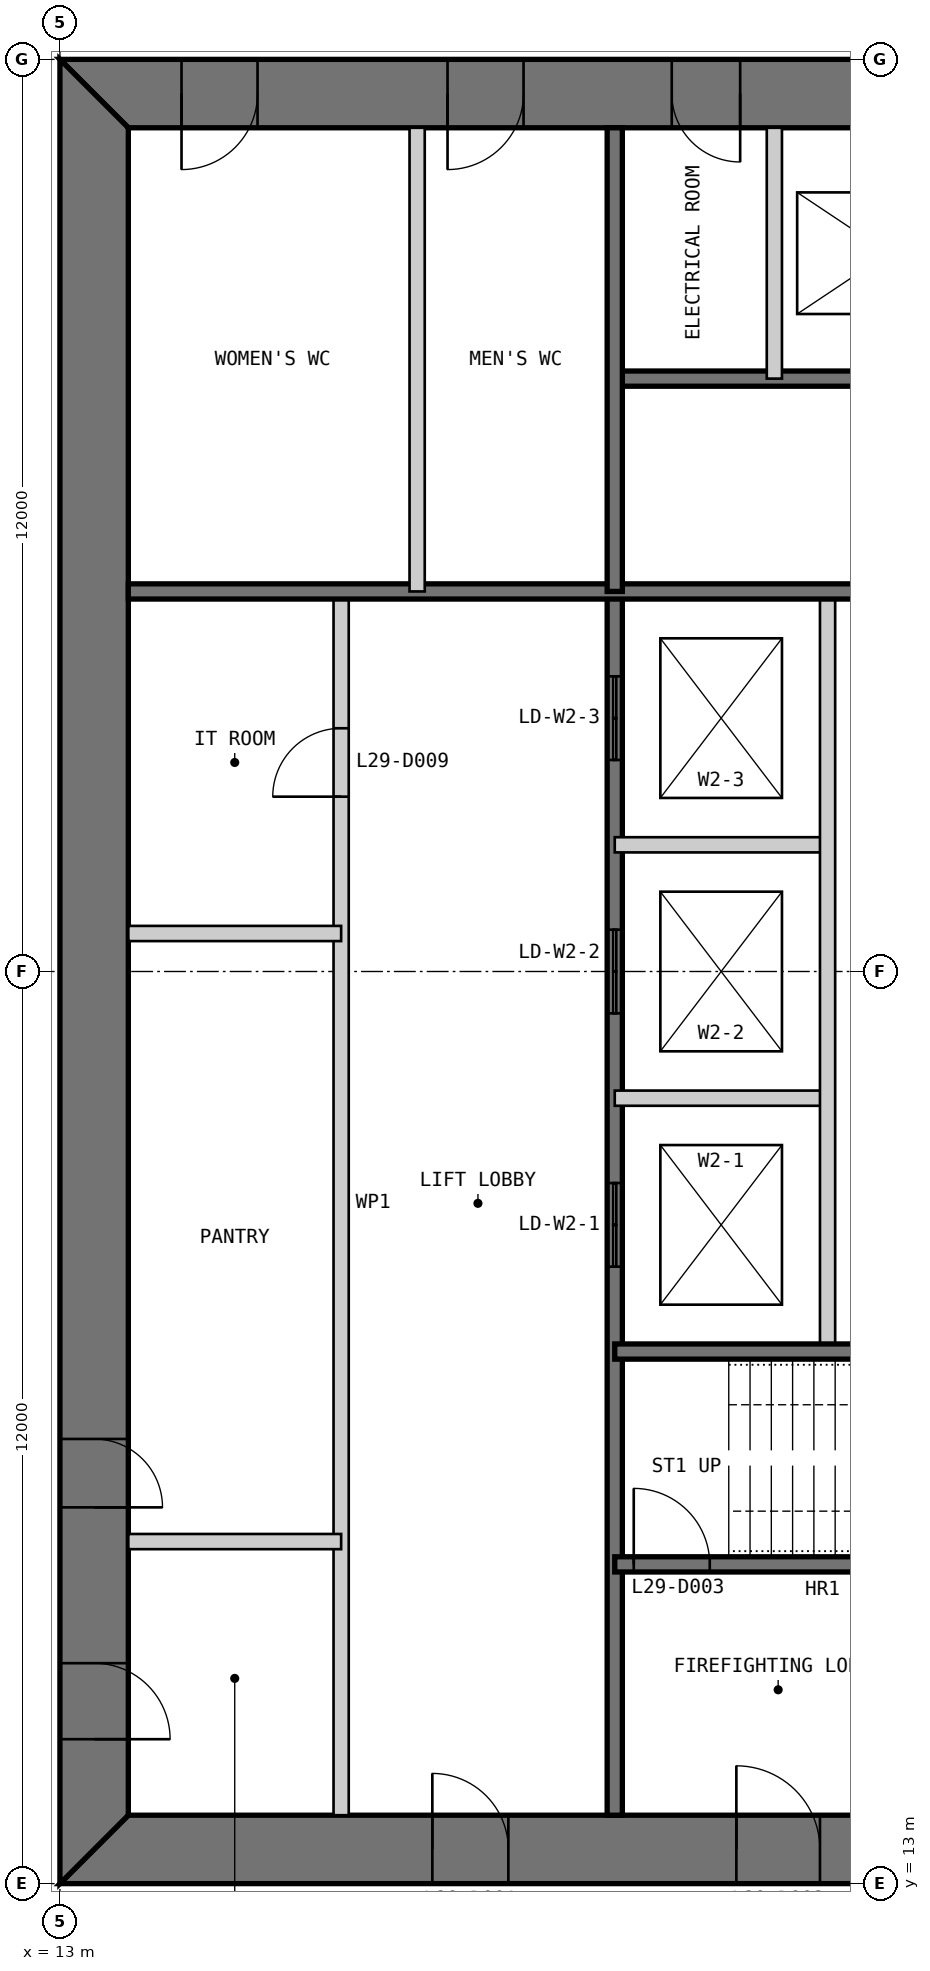
"""IFC4 building model, lengths in metres.
Left out: names, types, materials, properties, quantities, classifications, styles, units other than length and angle.
Written with IfcOpenShell. Run it as: python <this file> out.ifc"""

import sys

from ifc_helpers import new_model, si_unit, direction, frame, frame_2d, origin, place, context, subcontext, project, spatial, polyline, rectangle, outline, extrude, element, fill, save


model = new_model("IFC4")
c1 = context("Model", 3, precision=1e-05, world=origin(), true_north=direction((0.0, 1.0)))
c2 = subcontext(c1, "Body", "Model", "MODEL_VIEW")
j1 = project(units=[si_unit("LENGTHUNIT", "METRE"), si_unit("PLANEANGLEUNIT", "RADIAN")], contexts=[c1])
p1 = place(None, origin())
s1 = spatial("IfcSite", under=j1, at=p1, CompositionType="ELEMENT")
p2 = place(p1, origin())
s2 = spatial("IfcBuilding", under=s1, at=p2, CompositionType="ELEMENT")
p3 = place(p2, frame((0.0, 0.0, 126.4)))
s3 = spatial("IfcBuildingStorey", under=s2, at=p3, CompositionType="ELEMENT", Elevation=126.4)
p4 = place(p3, frame((13.0, 13.45, 0.0), z_axis=(0.0, 0.0, 1.0), x_axis=(1.0, 0.0, 0.0)))
e1 = element("IfcWall", 1, at=p4, inside=s3, PredefinedType="SHEAR", context=c2, shape_type="SweptSolid", body=[
    extrude(outline(polyline([(0.0, -0.45), (24.0, -0.45), (23.1, 0.45), (0.9, 0.45), (0.0, -0.45)])), origin(), (0.0, 0.0, 1.0), 4.0),
])
p5 = place(p4, frame((4.9, 0.0, 0.0)))
e2 = element("IfcOpeningElement", 2, at=p5, cuts=e1, PredefinedType="OPENING", context=c2, shape_type="SweptSolid", body=[
    extrude(rectangle(XDim=1.0, YDim=2.2, at=frame_2d((0.5, 1.1))), frame((0.0, 0.46, 0.0), z_axis=(0.0, -1.0, 0.0), x_axis=(1.0, 0.0, 0.0)), (0.0, 0.0, 1.0), 0.92),
])
p6 = place(p4, frame((8.9, 0.0, 0.0)))
e3 = element("IfcOpeningElement", 3, at=p6, cuts=e1, PredefinedType="OPENING", context=c2, shape_type="SweptSolid", body=[
    extrude(rectangle(XDim=1.1, YDim=2.2, at=frame_2d((0.55, 1.1))), frame((0.0, 0.46, 0.0), z_axis=(0.0, -1.0, 0.0), x_axis=(1.0, 0.0, 0.0)), (0.0, 0.0, 1.0), 0.92),
])
p7 = place(p4, frame((15.05, 0.0, 0.0)))
e4 = element("IfcOpeningElement", 4, at=p7, cuts=e1, PredefinedType="OPENING", context=c2, shape_type="SweptSolid", body=[
    extrude(rectangle(XDim=0.9, YDim=2.2, at=frame_2d((0.45, 1.1))), frame((0.0, 0.46, 0.0), z_axis=(0.0, -1.0, 0.0), x_axis=(1.0, 0.0, 0.0)), (0.0, 0.0, 1.0), 0.92),
])
p8 = place(p4, frame((17.9, 0.0, 0.0)))
e5 = element("IfcOpeningElement", 5, at=p8, cuts=e1, PredefinedType="OPENING", context=c2, shape_type="SweptSolid", body=[
    extrude(rectangle(XDim=1.0, YDim=2.2, at=frame_2d((0.5, 1.1))), frame((0.0, 0.46, 0.0), z_axis=(0.0, -1.0, 0.0), x_axis=(1.0, 0.0, 0.0)), (0.0, 0.0, 1.0), 0.92),
])
p9 = place(p4, frame((21.4, 0.0, 0.0)))
e6 = element("IfcOpeningElement", 6, at=p9, cuts=e1, PredefinedType="OPENING", context=c2, shape_type="SweptSolid", body=[
    extrude(rectangle(XDim=1.0, YDim=2.2, at=frame_2d((0.5, 1.1))), frame((0.0, 0.46, 0.0), z_axis=(0.0, -1.0, 0.0), x_axis=(1.0, 0.0, 0.0)), (0.0, 0.0, 1.0), 0.92),
])
p10 = place(p3, frame((37.0, 36.55, 0.0), z_axis=(0.0, 0.0, 1.0), x_axis=(-1.0, 0.0, 0.0)))
e7 = element("IfcWall", 7, at=p10, inside=s3, PredefinedType="SHEAR", context=c2, shape_type="SweptSolid", body=[
    extrude(outline(polyline([(0.0, -0.45), (24.0, -0.45), (23.1, 0.45), (0.9, 0.45), (0.0, -0.45)])), origin(), (0.0, 0.0, 1.0), 4.0),
])
p11 = place(p10, frame((4.9, 0.0, 0.0)))
e8 = element("IfcOpeningElement", 8, at=p11, cuts=e7, PredefinedType="OPENING", context=c2, shape_type="SweptSolid", body=[
    extrude(rectangle(XDim=1.0, YDim=2.2, at=frame_2d((0.5, 1.1))), frame((0.0, 0.46, 0.0), z_axis=(0.0, -1.0, 0.0), x_axis=(1.0, 0.0, 0.0)), (0.0, 0.0, 1.0), 0.92),
])
p12 = place(p10, frame((8.9, 0.0, 0.0)))
e9 = element("IfcOpeningElement", 9, at=p12, cuts=e7, PredefinedType="OPENING", context=c2, shape_type="SweptSolid", body=[
    extrude(rectangle(XDim=1.1, YDim=2.2, at=frame_2d((0.55, 1.1))), frame((0.0, 0.46, 0.0), z_axis=(0.0, -1.0, 0.0), x_axis=(1.0, 0.0, 0.0)), (0.0, 0.0, 1.0), 0.92),
])
p13 = place(p10, frame((15.05, 0.0, 0.0)))
e10 = element("IfcOpeningElement", 10, at=p13, cuts=e7, PredefinedType="OPENING", context=c2, shape_type="SweptSolid", body=[
    extrude(rectangle(XDim=0.9, YDim=2.2, at=frame_2d((0.45, 1.1))), frame((0.0, 0.46, 0.0), z_axis=(0.0, -1.0, 0.0), x_axis=(1.0, 0.0, 0.0)), (0.0, 0.0, 1.0), 0.92),
])
p14 = place(p10, frame((17.9, 0.0, 0.0)))
e11 = element("IfcOpeningElement", 11, at=p14, cuts=e7, PredefinedType="OPENING", context=c2, shape_type="SweptSolid", body=[
    extrude(rectangle(XDim=1.0, YDim=2.2, at=frame_2d((0.5, 1.1))), frame((0.0, 0.46, 0.0), z_axis=(0.0, -1.0, 0.0), x_axis=(1.0, 0.0, 0.0)), (0.0, 0.0, 1.0), 0.92),
])
p15 = place(p10, frame((21.4, 0.0, 0.0)))
e12 = element("IfcOpeningElement", 12, at=p15, cuts=e7, PredefinedType="OPENING", context=c2, shape_type="SweptSolid", body=[
    extrude(rectangle(XDim=1.0, YDim=2.2, at=frame_2d((0.5, 1.1))), frame((0.0, 0.46, 0.0), z_axis=(0.0, -1.0, 0.0), x_axis=(1.0, 0.0, 0.0)), (0.0, 0.0, 1.0), 0.92),
])
p16 = place(p3, frame((13.45, 36.1, 0.0), z_axis=(0.0, 0.0, 1.0), x_axis=(0.0, -1.0, 0.0)))
e13 = element("IfcWall", 13, at=p16, inside=s3, PredefinedType="SHEAR", context=c2, shape_type="SweptSolid", body=[
    extrude(outline(polyline([(-0.9, -0.45), (23.1, -0.45), (22.2, 0.45), (0.0, 0.45), (-0.9, -0.45)])), origin(), (0.0, 0.0, 1.0), 4.0),
])
p17 = place(p16, frame((20.2, 0.0, 0.0)))
e14 = element("IfcOpeningElement", 14, at=p17, cuts=e13, PredefinedType="OPENING", context=c2, shape_type="SweptSolid", body=[
    extrude(rectangle(XDim=1.0, YDim=2.2, at=frame_2d((0.5, 1.1))), frame((0.0, 0.46, 0.0), z_axis=(0.0, -1.0, 0.0), x_axis=(1.0, 0.0, 0.0)), (0.0, 0.0, 1.0), 0.92),
])
p18 = place(p16, frame((17.25, 0.0, 0.0)))
e15 = element("IfcOpeningElement", 15, at=p18, cuts=e13, PredefinedType="OPENING", context=c2, shape_type="SweptSolid", body=[
    extrude(rectangle(XDim=0.9, YDim=2.2, at=frame_2d((0.45, 1.1))), frame((0.0, 0.46, 0.0), z_axis=(0.0, -1.0, 0.0), x_axis=(1.0, 0.0, 0.0)), (0.0, 0.0, 1.0), 0.92),
])
p19 = place(p3, frame((16.7, 13.9, 0.0), z_axis=(0.0, 0.0, 1.0), x_axis=(0.0, 1.0, 0.0)))
e16 = element("IfcWall", 16, at=p19, inside=s3, PredefinedType="PARTITIONING", context=c2, shape_type="SweptSolid", body=[
    extrude(rectangle(XDim=16.1, YDim=0.2, at=frame_2d((8.05, 0.0))), origin(), (0.0, 0.0, 1.0), 3.8),
])
p20 = place(p19, frame((13.4, 0.0, 0.0)))
e17 = element("IfcOpeningElement", 17, at=p20, cuts=e16, PredefinedType="OPENING", context=c2, shape_type="SweptSolid", body=[
    extrude(rectangle(XDim=0.9, YDim=2.2, at=frame_2d((0.45, 1.1))), frame((0.0, 0.11, 0.0), z_axis=(0.0, -1.0, 0.0), x_axis=(1.0, 0.0, 0.0)), (0.0, 0.0, 1.0), 0.22),
])
p21 = place(p3, frame((20.3, 13.9, 0.0), z_axis=(0.0, 0.0, 1.0), x_axis=(0.0, 1.0, 0.0)))
e18 = element("IfcWall", 18, at=p21, inside=s3, PredefinedType="SOLIDWALL", context=c2, shape_type="SweptSolid", body=[
    extrude(rectangle(XDim=16.1, YDim=0.2, at=frame_2d((8.05, 0.0))), origin(), (0.0, 0.0, 1.0), 3.8),
])
p22 = place(p21, frame((7.217, 0.0, 0.0)))
e19 = element("IfcOpeningElement", 19, at=p22, cuts=e18, PredefinedType="OPENING", context=c2, shape_type="SweptSolid", body=[
    extrude(rectangle(XDim=1.1, YDim=2.2, at=frame_2d((0.55, 1.1))), frame((0.0, 0.11, 0.0), z_axis=(0.0, -1.0, 0.0), x_axis=(1.0, 0.0, 0.0)), (0.0, 0.0, 1.0), 0.22),
])
p23 = place(p21, frame((10.55, 0.0, 0.0)))
e20 = element("IfcOpeningElement", 20, at=p23, cuts=e18, PredefinedType="OPENING", context=c2, shape_type="SweptSolid", body=[
    extrude(rectangle(XDim=1.1, YDim=2.2, at=frame_2d((0.55, 1.1))), frame((0.0, 0.11, 0.0), z_axis=(0.0, -1.0, 0.0), x_axis=(1.0, 0.0, 0.0)), (0.0, 0.0, 1.0), 0.22),
])
p24 = place(p21, frame((13.883, 0.0, 0.0)))
e21 = element("IfcOpeningElement", 21, at=p24, cuts=e18, PredefinedType="OPENING", context=c2, shape_type="SweptSolid", body=[
    extrude(rectangle(XDim=1.1, YDim=2.2, at=frame_2d((0.55, 1.1))), frame((0.0, 0.11, 0.0), z_axis=(0.0, -1.0, 0.0), x_axis=(1.0, 0.0, 0.0)), (0.0, 0.0, 1.0), 0.22),
])
for number, where, z_axis, x_axis in (
    (22, (20.3, 23.333, 0.0), (0.0, 0.0, 1.0), (1.0, 0.0, 0.0)),
    (23, (20.3, 26.667, 0.0), (0.0, 0.0, 1.0), (1.0, 0.0, 0.0)),
):
    element("IfcWall", number, at=place(p3, frame(where, z_axis=z_axis, x_axis=x_axis)), inside=s3, PredefinedType="PARTITIONING", context=c2, shape_type="SweptSolid", body=[
        extrude(rectangle(XDim=2.8, YDim=0.2, at=frame_2d((1.4, 0.0))), origin(), (0.0, 0.0, 1.0), 3.8),
    ])
p25 = place(p3, frame((23.1, 20.0, 0.0), z_axis=(0.0, 0.0, 1.0), x_axis=(0.0, 1.0, 0.0)))
e24 = element("IfcWall", 24, at=p25, inside=s3, PredefinedType="PARTITIONING", context=c2, shape_type="SweptSolid", body=[
    extrude(rectangle(XDim=10.0, YDim=0.2, at=frame_2d((5.0, 0.0))), origin(), (0.0, 0.0, 1.0), 3.8),
])
p26 = place(p3, frame((20.3, 17.2, 0.0), z_axis=(0.0, 0.0, 1.0), x_axis=(1.0, 0.0, 0.0)))
e25 = element("IfcWall", 25, at=p26, inside=s3, PredefinedType="SOLIDWALL", context=c2, shape_type="SweptSolid", body=[
    extrude(rectangle(XDim=9.4, YDim=0.2, at=frame_2d((4.7, 0.0))), origin(), (0.0, 0.0, 1.0), 3.8),
])
p27 = place(p26, frame((0.25, 0.0, 0.0)))
e26 = element("IfcOpeningElement", 26, at=p27, cuts=e25, PredefinedType="OPENING", context=c2, shape_type="SweptSolid", body=[
    extrude(rectangle(XDim=1.0, YDim=2.2, at=frame_2d((0.5, 1.1))), frame((0.0, 0.11, 0.0), z_axis=(0.0, -1.0, 0.0), x_axis=(1.0, 0.0, 0.0)), (0.0, 0.0, 1.0), 0.22),
])
p28 = place(p3, frame((20.3, 20.0, 0.0), z_axis=(0.0, 0.0, 1.0), x_axis=(1.0, 0.0, 0.0)))
e27 = element("IfcWall", 27, at=p28, inside=s3, PredefinedType="SOLIDWALL", context=c2, shape_type="SweptSolid", body=[
    extrude(rectangle(XDim=15.8, YDim=0.2, at=frame_2d((7.9, 0.0))), origin(), (0.0, 0.0, 1.0), 3.8),
])
for number, where, z_axis, x_axis in (
    (28, (13.9, 17.5, 0.0), (0.0, 0.0, 1.0), (1.0, 0.0, 0.0)),
    (29, (13.9, 25.5, 0.0), (0.0, 0.0, 1.0), (1.0, 0.0, 0.0)),
):
    element("IfcWall", number, at=place(p3, frame(where, z_axis=z_axis, x_axis=x_axis)), inside=s3, PredefinedType="PARTITIONING", context=c2, shape_type="SweptSolid", body=[
        extrude(rectangle(XDim=2.8, YDim=0.2, at=frame_2d((1.4, 0.0))), origin(), (0.0, 0.0, 1.0), 3.8),
    ])
p29 = place(p3, frame((29.7, 32.8, 0.0), z_axis=(0.0, 0.0, 1.0), x_axis=(-1.0, 0.0, 0.0)))
e30 = element("IfcWall", 30, at=p29, inside=s3, PredefinedType="SOLIDWALL", context=c2, shape_type="SweptSolid", body=[
    extrude(rectangle(XDim=9.4, YDim=0.2, at=frame_2d((4.7, 0.0))), origin(), (0.0, 0.0, 1.0), 3.8),
])
p30 = place(p29, frame((0.25, 0.0, 0.0)))
e31 = element("IfcOpeningElement", 31, at=p30, cuts=e30, PredefinedType="OPENING", context=c2, shape_type="SweptSolid", body=[
    extrude(rectangle(XDim=1.0, YDim=2.2, at=frame_2d((0.5, 1.1))), frame((0.0, 0.11, 0.0), z_axis=(0.0, -1.0, 0.0), x_axis=(1.0, 0.0, 0.0)), (0.0, 0.0, 1.0), 0.22),
])
p31 = place(p3, frame((29.7, 30.0, 0.0), z_axis=(0.0, 0.0, 1.0), x_axis=(-1.0, 0.0, 0.0)))
e32 = element("IfcWall", 32, at=p31, inside=s3, PredefinedType="SOLIDWALL", context=c2, shape_type="SweptSolid", body=[
    extrude(rectangle(XDim=15.8, YDim=0.2, at=frame_2d((7.9, 0.0))), origin(), (0.0, 0.0, 1.0), 3.8),
])
p32 = place(p3, frame((22.4, 36.1, 0.0), z_axis=(0.0, 0.0, 1.0), x_axis=(0.0, -1.0, 0.0)))
e33 = element("IfcWall", 33, at=p32, inside=s3, PredefinedType="PARTITIONING", context=c2, shape_type="SweptSolid", body=[
    extrude(rectangle(XDim=3.3, YDim=0.2, at=frame_2d((1.65, 0.0))), origin(), (0.0, 0.0, 1.0), 3.8),
])
p33 = place(p3, frame((20.3, 36.1, 0.0), z_axis=(0.0, 0.0, 1.0), x_axis=(0.0, -1.0, 0.0)))
e34 = element("IfcWall", 34, at=p33, inside=s3, PredefinedType="SOLIDWALL", context=c2, shape_type="SweptSolid", body=[
    extrude(rectangle(XDim=6.1, YDim=0.2, at=frame_2d((3.05, 0.0))), origin(), (0.0, 0.0, 1.0), 3.8),
])
p34 = place(p3, frame((17.7, 36.1, 0.0), z_axis=(0.0, 0.0, 1.0), x_axis=(0.0, -1.0, 0.0)))
e35 = element("IfcWall", 35, at=p34, inside=s3, PredefinedType="PARTITIONING", context=c2, shape_type="SweptSolid", body=[
    extrude(rectangle(XDim=6.1, YDim=0.2, at=frame_2d((3.05, 0.0))), origin(), (0.0, 0.0, 1.0), 3.8),
])
p35 = place(p5, origin())
e36 = element("IfcDoor", 36, at=p35, inside=s3, OperationType="SINGLE_SWING_LEFT", PredefinedType="DOOR", context=c2, shape_type="SweptSolid", body=[
    extrude(rectangle(XDim=1.0, YDim=2.2, at=frame_2d((0.5, 1.1))), frame((0.0, 0.025, 0.0), z_axis=(0.0, -1.0, 0.0), x_axis=(1.0, 0.0, 0.0)), (0.0, 0.0, 1.0), 0.05),
    extrude(outline(polyline([(0.0, 0.0), (0.04, 0.0), (0.04, 2.16), (0.96, 2.16), (0.96, 0.0), (1.0, 0.0), (1.0, 2.2), (0.0, 2.2), (0.0, 0.0)])), frame((0.0, 0.3, 0.0), z_axis=(0.0, -1.0, 0.0), x_axis=(1.0, 0.0, 0.0)), (0.0, 0.0, 1.0), 0.6),
])
fill(e2, e36)
p36 = place(p6, origin())
e37 = element("IfcDoor", 37, at=p36, inside=s3, OperationType="SINGLE_SWING_LEFT", PredefinedType="DOOR", context=c2, shape_type="SweptSolid", body=[
    extrude(rectangle(XDim=1.1, YDim=2.2, at=frame_2d((0.55, 1.1))), frame((0.0, 0.025, 0.0), z_axis=(0.0, -1.0, 0.0), x_axis=(1.0, 0.0, 0.0)), (0.0, 0.0, 1.0), 0.05),
    extrude(outline(polyline([(0.0, 0.0), (0.04, 0.0), (0.04, 2.16), (1.06, 2.16), (1.06, 0.0), (1.1, 0.0), (1.1, 2.2), (0.0, 2.2), (0.0, 0.0)])), frame((0.0, 0.3, 0.0), z_axis=(0.0, -1.0, 0.0), x_axis=(1.0, 0.0, 0.0)), (0.0, 0.0, 1.0), 0.6),
])
fill(e3, e37)
p37 = place(p27, origin())
e38 = element("IfcDoor", 38, at=p37, inside=s3, OperationType="SINGLE_SWING_LEFT", PredefinedType="DOOR", context=c2, shape_type="SweptSolid", body=[
    extrude(rectangle(XDim=1.0, YDim=2.2, at=frame_2d((0.5, 1.1))), frame((0.0, 0.025, 0.0), z_axis=(0.0, -1.0, 0.0), x_axis=(1.0, 0.0, 0.0)), (0.0, 0.0, 1.0), 0.05),
])
fill(e26, e38)
p38 = place(p17, origin())
e39 = element("IfcDoor", 39, at=p38, inside=s3, OperationType="SINGLE_SWING_RIGHT", PredefinedType="DOOR", context=c2, shape_type="SweptSolid", body=[
    extrude(rectangle(XDim=1.0, YDim=2.2, at=frame_2d((0.5, 1.1))), frame((0.0, 0.025, 0.0), z_axis=(0.0, -1.0, 0.0), x_axis=(1.0, 0.0, 0.0)), (0.0, 0.0, 1.0), 0.05),
    extrude(outline(polyline([(0.0, 0.0), (0.04, 0.0), (0.04, 2.16), (0.96, 2.16), (0.96, 0.0), (1.0, 0.0), (1.0, 2.2), (0.0, 2.2), (0.0, 0.0)])), frame((0.0, 0.3, 0.0), z_axis=(0.0, -1.0, 0.0), x_axis=(1.0, 0.0, 0.0)), (0.0, 0.0, 1.0), 0.6),
])
fill(e14, e39)
p39 = place(p18, origin())
e40 = element("IfcDoor", 40, at=p39, inside=s3, OperationType="SINGLE_SWING_RIGHT", PredefinedType="DOOR", context=c2, shape_type="SweptSolid", body=[
    extrude(rectangle(XDim=0.9, YDim=2.2, at=frame_2d((0.45, 1.1))), frame((0.0, 0.025, 0.0), z_axis=(0.0, -1.0, 0.0), x_axis=(1.0, 0.0, 0.0)), (0.0, 0.0, 1.0), 0.05),
    extrude(outline(polyline([(0.0, 0.0), (0.04, 0.0), (0.04, 2.16), (0.86, 2.16), (0.86, 0.0), (0.9, 0.0), (0.9, 2.2), (0.0, 2.2), (0.0, 0.0)])), frame((0.0, 0.3, 0.0), z_axis=(0.0, -1.0, 0.0), x_axis=(1.0, 0.0, 0.0)), (0.0, 0.0, 1.0), 0.6),
])
fill(e15, e40)
p40 = place(p20, origin())
e41 = element("IfcDoor", 41, at=p40, inside=s3, OperationType="SINGLE_SWING_LEFT", PredefinedType="DOOR", context=c2, shape_type="SweptSolid", body=[
    extrude(rectangle(XDim=0.9, YDim=2.2, at=frame_2d((0.45, 1.1))), frame((0.0, 0.025, 0.0), z_axis=(0.0, -1.0, 0.0), x_axis=(1.0, 0.0, 0.0)), (0.0, 0.0, 1.0), 0.05),
])
fill(e17, e41)
p41 = place(p13, origin())
e42 = element("IfcDoor", 42, at=p41, inside=s3, OperationType="SINGLE_SWING_LEFT", PredefinedType="DOOR", context=c2, shape_type="SweptSolid", body=[
    extrude(rectangle(XDim=0.9, YDim=2.2, at=frame_2d((0.45, 1.1))), frame((0.0, 0.025, 0.0), z_axis=(0.0, -1.0, 0.0), x_axis=(1.0, 0.0, 0.0)), (0.0, 0.0, 1.0), 0.05),
    extrude(outline(polyline([(0.0, 0.0), (0.04, 0.0), (0.04, 2.16), (0.86, 2.16), (0.86, 0.0), (0.9, 0.0), (0.9, 2.2), (0.0, 2.2), (0.0, 0.0)])), frame((0.0, 0.3, 0.0), z_axis=(0.0, -1.0, 0.0), x_axis=(1.0, 0.0, 0.0)), (0.0, 0.0, 1.0), 0.6),
])
fill(e10, e42)
p42 = place(p14, origin())
e43 = element("IfcDoor", 43, at=p42, inside=s3, OperationType="SINGLE_SWING_RIGHT", PredefinedType="DOOR", context=c2, shape_type="SweptSolid", body=[
    extrude(rectangle(XDim=1.0, YDim=2.2, at=frame_2d((0.5, 1.1))), frame((0.0, 0.025, 0.0), z_axis=(0.0, -1.0, 0.0), x_axis=(1.0, 0.0, 0.0)), (0.0, 0.0, 1.0), 0.05),
    extrude(outline(polyline([(0.0, 0.0), (0.04, 0.0), (0.04, 2.16), (0.96, 2.16), (0.96, 0.0), (1.0, 0.0), (1.0, 2.2), (0.0, 2.2), (0.0, 0.0)])), frame((0.0, 0.3, 0.0), z_axis=(0.0, -1.0, 0.0), x_axis=(1.0, 0.0, 0.0)), (0.0, 0.0, 1.0), 0.6),
])
fill(e11, e43)
p43 = place(p15, origin())
e44 = element("IfcDoor", 44, at=p43, inside=s3, OperationType="SINGLE_SWING_RIGHT", PredefinedType="DOOR", context=c2, shape_type="SweptSolid", body=[
    extrude(rectangle(XDim=1.0, YDim=2.2, at=frame_2d((0.5, 1.1))), frame((0.0, 0.025, 0.0), z_axis=(0.0, -1.0, 0.0), x_axis=(1.0, 0.0, 0.0)), (0.0, 0.0, 1.0), 0.05),
    extrude(outline(polyline([(0.0, 0.0), (0.04, 0.0), (0.04, 2.16), (0.96, 2.16), (0.96, 0.0), (1.0, 0.0), (1.0, 2.2), (0.0, 2.2), (0.0, 0.0)])), frame((0.0, 0.3, 0.0), z_axis=(0.0, -1.0, 0.0), x_axis=(1.0, 0.0, 0.0)), (0.0, 0.0, 1.0), 0.6),
])
fill(e12, e44)
p44 = place(p22, origin())
e45 = element("IfcDoor", 45, at=p44, inside=s3, OperationType="DOUBLE_DOOR_SLIDING", PredefinedType="DOOR", context=c2, shape_type="SweptSolid", body=[
    extrude(rectangle(XDim=1.1, YDim=2.2, at=frame_2d((0.55, 1.1))), frame((0.0, 0.025, 0.0), z_axis=(0.0, -1.0, 0.0), x_axis=(1.0, 0.0, 0.0)), (0.0, 0.0, 1.0), 0.05),
])
fill(e19, e45)
p45 = place(p23, origin())
e46 = element("IfcDoor", 46, at=p45, inside=s3, OperationType="DOUBLE_DOOR_SLIDING", PredefinedType="DOOR", context=c2, shape_type="SweptSolid", body=[
    extrude(rectangle(XDim=1.1, YDim=2.2, at=frame_2d((0.55, 1.1))), frame((0.0, 0.025, 0.0), z_axis=(0.0, -1.0, 0.0), x_axis=(1.0, 0.0, 0.0)), (0.0, 0.0, 1.0), 0.05),
])
fill(e20, e46)
p46 = place(p24, origin())
e47 = element("IfcDoor", 47, at=p46, inside=s3, OperationType="DOUBLE_DOOR_SLIDING", PredefinedType="DOOR", context=c2, shape_type="SweptSolid", body=[
    extrude(rectangle(XDim=1.1, YDim=2.2, at=frame_2d((0.55, 1.1))), frame((0.0, 0.025, 0.0), z_axis=(0.0, -1.0, 0.0), x_axis=(1.0, 0.0, 0.0)), (0.0, 0.0, 1.0), 0.05),
])
fill(e21, e47)
save(model, sys.argv[1])
